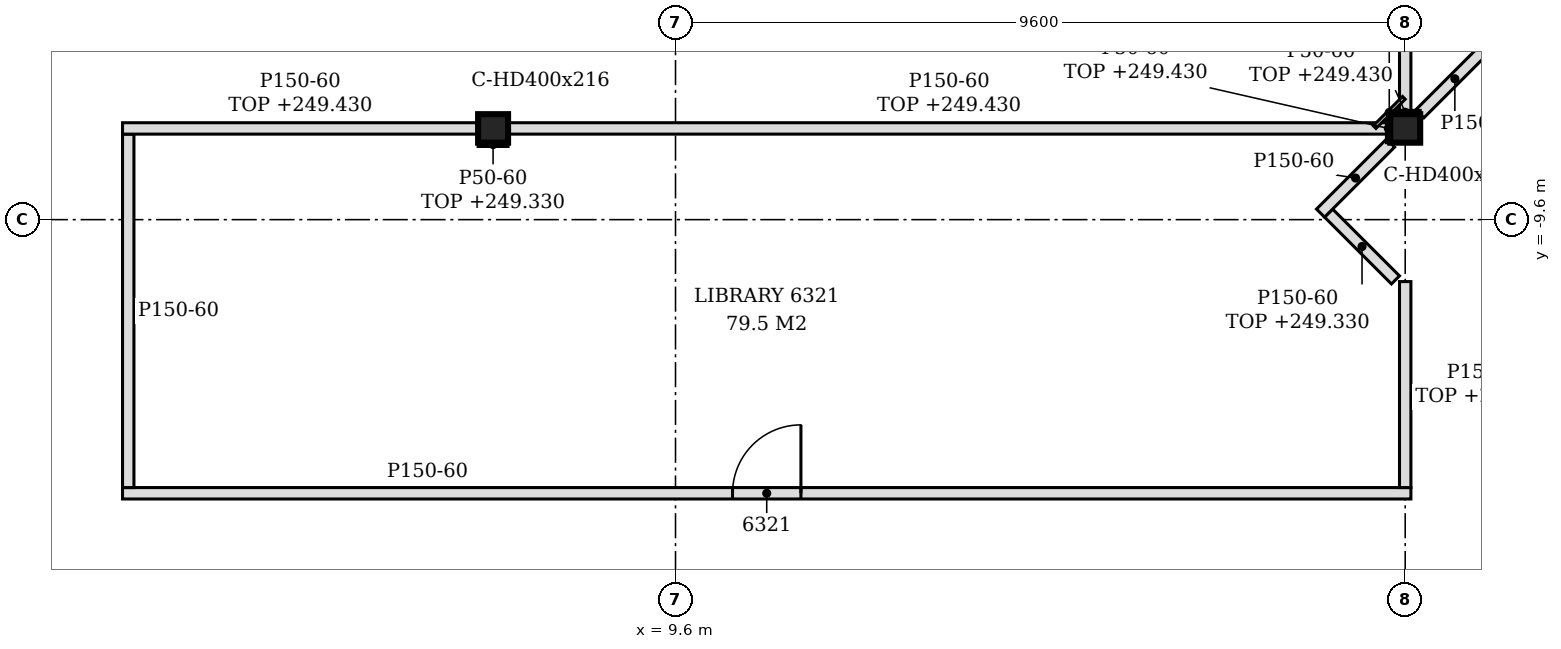
"""IFC4 building model, lengths in metres.
Left out: names, types, materials, properties, quantities, classifications, styles, units other than length and angle.
Written with IfcOpenShell. Run it as: python <this file> out.ifc"""

import sys

from ifc_helpers import new_model, si_unit, direction, frame, frame_2d, origin, origin_2d, place, context, subcontext, project, spatial, polyline, rectangle, i_section, outline, extrude, element, fill, save


model = new_model("IFC4")
c1 = context("Model", 3, precision=1e-05, world=origin(), true_north=direction((0.0, 1.0)))
c2 = subcontext(c1, "Body", "Model", "MODEL_VIEW")
j1 = project(units=[si_unit("LENGTHUNIT", "METRE"), si_unit("PLANEANGLEUNIT", "RADIAN")], contexts=[c1])
p1 = place(None, origin())
s1 = spatial("IfcSite", under=j1, at=p1, CompositionType="ELEMENT")
p2 = place(p1, origin())
s2 = spatial("IfcBuilding", under=s1, at=p2, CompositionType="ELEMENT")
p3 = place(p2, frame((0.0, 0.0, 246.6)))
s3 = spatial("IfcBuildingStorey", under=s2, at=p3, CompositionType="ELEMENT", Elevation=246.6)
for number, where, z_axis, x_axis in (
    (1, (7.2, -8.4, -0.15), (0.0, 0.0, 1.0), (1.0, 0.0, 0.0)),
    (2, (19.2, -8.4, -0.15), (0.0, 0.0, 1.0), (1.0, 0.0, 0.0)),
):
    element("IfcColumn", number, at=place(p3, frame(where, z_axis=z_axis, x_axis=x_axis)), inside=s3, PredefinedType="COLUMN", context=c2, shape_type="SweptSolid", body=[
        extrude(i_section(OverallWidth=0.394, OverallDepth=0.375, WebThickness=0.017, FlangeThickness=0.028, FilletRadius=0.015, at=origin_2d()), origin(), (0.0, 0.0, 1.0), 3.6),
    ])
p4 = place(p3, frame((2.325, -13.2, 0.0), z_axis=(0.0, 0.0, 1.0), x_axis=(1.0, 0.0, 0.0)))
e3 = element("IfcWall", 3, at=p4, inside=s3, PredefinedType="PARTITIONING", context=c2, shape_type="SweptSolid", body=[
    extrude(outline(polyline([(0.0, 0.0), (16.95, 0.0), (16.95, 2.73), (16.725, 2.73), (16.723, 3.45), (5.025, 3.45), (5.023, 2.73), (4.725, 2.73), (4.723, 3.45), (0.0, 3.45), (0.0, 0.0)])), frame((0.0, 0.075, 0.0), z_axis=(0.0, -1.0, 0.0), x_axis=(1.0, 0.0, 0.0)), (0.0, 0.0, 1.0), 0.15),
])
p5 = place(p4, frame((8.025, 0.0, 0.0)))
e4 = element("IfcOpeningElement", 4, at=p5, cuts=e3, PredefinedType="OPENING", context=c2, shape_type="SweptSolid", body=[
    extrude(rectangle(XDim=0.9, YDim=2.1, at=frame_2d((0.45, 1.05))), frame((0.0, 0.085, 0.0), z_axis=(0.0, -1.0, 0.0), x_axis=(1.0, 0.0, 0.0)), (0.0, 0.0, 1.0), 0.17),
])
p6 = place(p3, frame((2.4, -13.125, 0.0), z_axis=(0.0, 0.0, 1.0), x_axis=(0.0, 1.0, 0.0)))
e5 = element("IfcWall", 5, at=p6, inside=s3, PredefinedType="PARTITIONING", context=c2, shape_type="SweptSolid", body=[
    extrude(outline(polyline([(0.0, 0.0), (4.65, 0.0), (4.65, 2.83), (4.575, 2.83), (4.573, 3.45), (0.0, 3.45), (0.0, 0.0)])), frame((0.0, 0.075, 0.0), z_axis=(0.0, -1.0, 0.0), x_axis=(1.0, 0.0, 0.0)), (0.0, 0.0, 1.0), 0.15),
])
p7 = place(p3, frame((19.2, -13.125, 0.0), z_axis=(0.0, 0.0, 1.0), x_axis=(0.0, 1.0, 0.0)))
e6 = element("IfcWall", 6, at=p7, inside=s3, PredefinedType="PARTITIONING", context=c2, shape_type="SweptSolid", body=[
    extrude(rectangle(XDim=2.71, YDim=0.15, at=frame_2d((1.355, 0.0))), origin(), (0.0, 0.0, 1.0), 2.73),
])
p8 = place(p3, frame((19.072, -10.393, 0.0), z_axis=(0.0, 0.0, 1.0), x_axis=(-0.70740114323, 0.706812296552, 0.0)))
e7 = element("IfcWall", 7, at=p8, inside=s3, PredefinedType="PARTITIONING", context=c2, shape_type="SweptSolid", body=[
    extrude(rectangle(XDim=1.244, YDim=0.15, at=frame_2d((0.622, 0.0))), origin(), (0.0, 0.0, 1.0), 2.73),
])
p9 = place(p3, frame((18.086, -9.514, 0.0), z_axis=(0.0, 0.0, 1.0), x_axis=(0.707200419109, 0.707013130862, 0.0)))
e8 = element("IfcWall", 8, at=p9, inside=s3, PredefinedType="PARTITIONING", context=c2, shape_type="SweptSolid", body=[
    extrude(rectangle(XDim=1.303, YDim=0.15, at=frame_2d((0.652, 0.0))), origin(), (0.0, 0.0, 1.0), 3.45),
])
p10 = place(p3, frame((2.325, -8.4, 0.0), z_axis=(0.0, 0.0, 1.0), x_axis=(1.0, 0.0, 0.0)))
e9 = element("IfcWall", 9, at=p10, inside=s3, PredefinedType="PARTITIONING", context=c2, shape_type="SweptSolid", body=[
    extrude(rectangle(XDim=4.678, YDim=0.15, at=frame_2d((2.339, 0.0))), origin(), (0.0, 0.0, 1.0), 2.83),
])
p11 = place(p3, frame((7.397, -8.4, 0.0), z_axis=(0.0, 0.0, 1.0), x_axis=(1.0, 0.0, 0.0)))
e10 = element("IfcWall", 10, at=p11, inside=s3, PredefinedType="PARTITIONING", context=c2, shape_type="SweptSolid", body=[
    extrude(rectangle(XDim=11.606, YDim=0.15, at=frame_2d((5.803, 0.0))), origin(), (0.0, 0.0, 1.0), 2.83),
])
p12 = place(p3, frame((19.2, -8.212, 0.0), z_axis=(0.0, 0.0, 1.0), x_axis=(0.0, 1.0, 0.0)))
e11 = element("IfcWall", 11, at=p12, inside=s3, PredefinedType="PARTITIONING", context=c2, shape_type="SweptSolid", body=[
    extrude(rectangle(XDim=9.337, YDim=0.15, at=frame_2d((4.669, 0.0))), origin(), (0.0, 0.0, 1.0), 2.83),
])
p13 = place(p3, frame((19.392, -8.208, 0.0), z_axis=(0.0, 0.0, 1.0), x_axis=(0.707106781187, 0.707106781187, 0.0)))
e12 = element("IfcWall", 12, at=p13, inside=s3, PredefinedType="PARTITIONING", context=c2, shape_type="SweptSolid", body=[
    extrude(rectangle(XDim=1.304, YDim=0.15, at=frame_2d((0.652, 0.0))), origin(), (0.0, 0.0, 1.0), 3.45),
])
p14 = place(p3, frame((18.798, -8.382, 0.0), z_axis=(0.0, 0.0, 1.0), x_axis=(0.707106781187, 0.707106781187, 0.0)))
e13 = element("IfcWall", 13, at=p14, inside=s3, PredefinedType="PARTITIONING", context=c2, shape_type="SweptSolid", body=[
    extrude(rectangle(XDim=0.544, YDim=0.05, at=frame_2d((0.272, 0.0))), origin(), (0.0, 0.0, 1.0), 2.83),
])
p15 = place(p3, frame((7.003, -8.613, 0.0), z_axis=(0.0, 0.0, 1.0), x_axis=(1.0, 0.0, 0.0)))
e14 = element("IfcWall", 14, at=p15, inside=s3, PredefinedType="PARTITIONING", context=c2, shape_type="SweptSolid", body=[
    extrude(rectangle(XDim=0.394, YDim=0.05, at=frame_2d((0.197, 0.0))), origin(), (0.0, 0.0, 1.0), 2.73),
])
p16 = place(p3, frame((19.003, -8.188, 0.0), z_axis=(0.0, 0.0, 1.0), x_axis=(1.0, 0.0, 0.0)))
e15 = element("IfcWall", 15, at=p16, inside=s3, PredefinedType="PARTITIONING", context=c2, shape_type="SweptSolid", body=[
    extrude(rectangle(XDim=0.394, YDim=0.05, at=frame_2d((0.197, 0.0))), origin(), (0.0, 0.0, 1.0), 2.83),
])
p17 = place(p3, frame((18.978, -8.587, 0.0), z_axis=(0.0, 0.0, 1.0), x_axis=(0.0, 1.0, 0.0)))
e16 = element("IfcWall", 16, at=p17, inside=s3, PredefinedType="PARTITIONING", context=c2, shape_type="SweptSolid", body=[
    extrude(rectangle(XDim=0.375, YDim=0.05, at=frame_2d((0.188, 0.0))), origin(), (0.0, 0.0, 1.0), 2.83),
])
p18 = place(p5, origin())
e17 = element("IfcDoor", 17, at=p18, inside=s3, OperationType="SINGLE_SWING_RIGHT", PredefinedType="DOOR", context=c2, shape_type="SweptSolid", body=[
    extrude(rectangle(XDim=0.9, YDim=2.1, at=frame_2d((0.45, 1.05))), frame((0.0, 0.025, 0.0), z_axis=(0.0, -1.0, 0.0), x_axis=(1.0, 0.0, 0.0)), (0.0, 0.0, 1.0), 0.05),
])
fill(e4, e17)
save(model, sys.argv[1])
